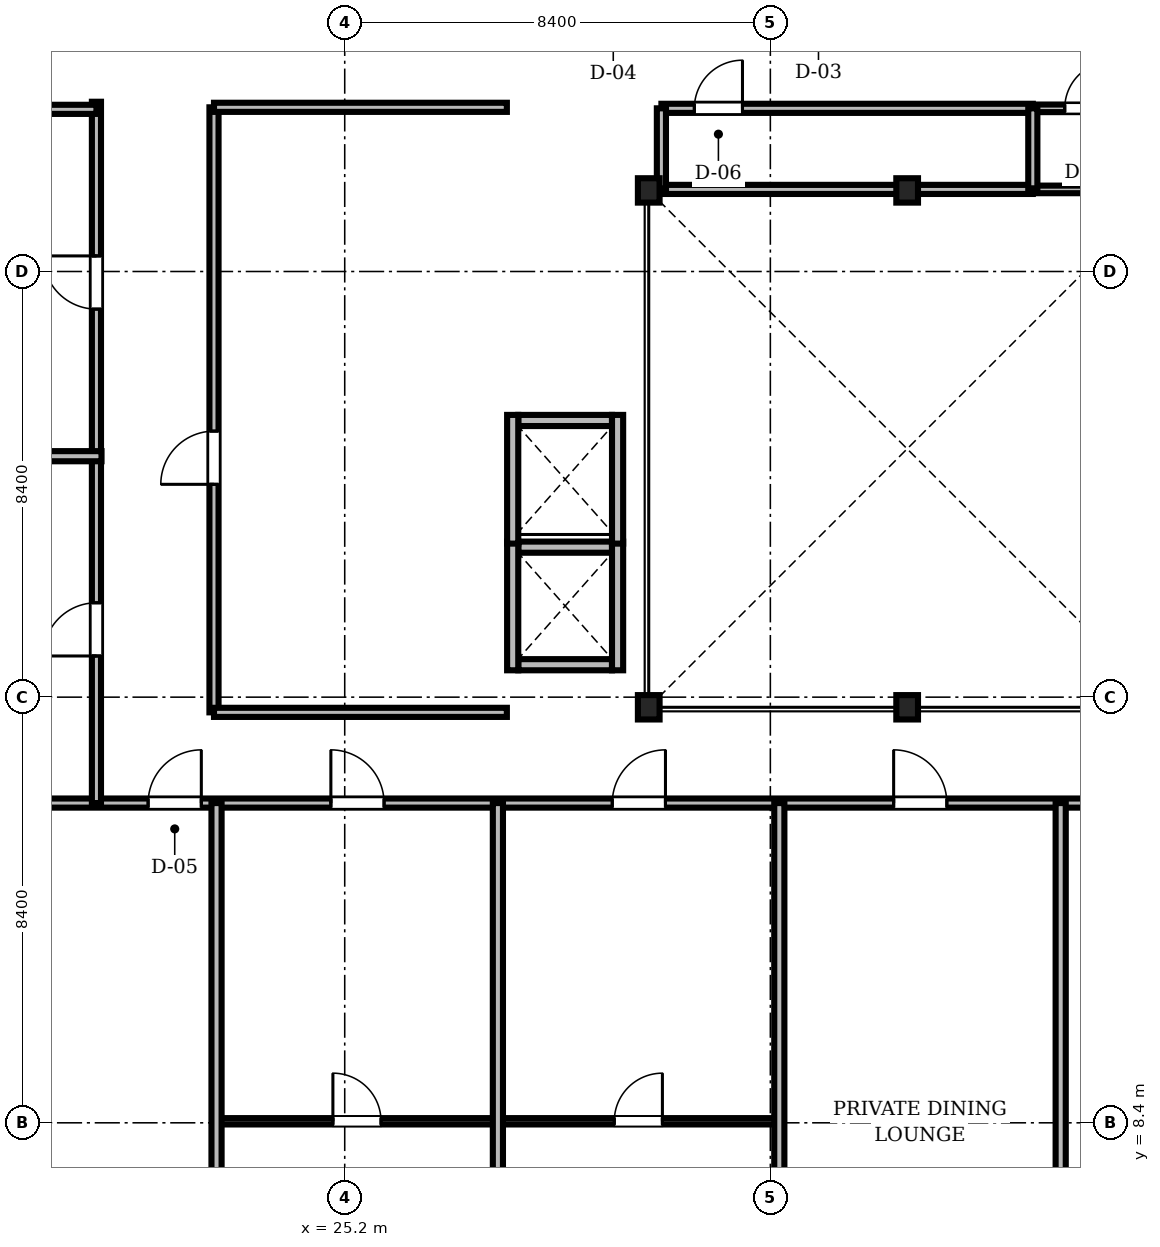
"""IFC4 building model, lengths in metres.
Left out: names, types, materials, properties, quantities, classifications, styles, units other than length and angle.
Written with IfcOpenShell. Run it as: python <this file> out.ifc"""

import sys

from ifc_helpers import new_model, si_unit, direction, frame, frame_2d, origin, origin_2d, place, context, subcontext, project, spatial, rectangle, i_section, extrude, source, transform, mapped, element, fill, save


model = new_model("IFC4")
c1 = context("Model", 3, precision=1e-05, world=origin(), true_north=direction((0.0, 1.0)))
c2 = subcontext(c1, "Body", "Model", "MODEL_VIEW")
j1 = project(units=[si_unit("LENGTHUNIT", "METRE"), si_unit("PLANEANGLEUNIT", "RADIAN")], contexts=[c1])
p1 = place(None, origin())
s1 = spatial("IfcSite", under=j1, at=p1, CompositionType="ELEMENT")
p2 = place(p1, origin())
s2 = spatial("IfcBuilding", under=s1, at=p2, CompositionType="ELEMENT")
p3 = place(p2, frame((0.0, 0.0, 71.4)))
s3 = spatial("IfcBuildingStorey", under=s2, at=p3, CompositionType="ELEMENT", Elevation=71.4)
m1 = source(origin(), c2, "Body", "SweptSolid", [
    extrude(i_section(OverallWidth=0.428, OverallDepth=0.481, WebThickness=0.04, FlangeThickness=0.063, FilletRadius=0.015, at=origin_2d()), origin(), (0.0, 0.0, 1.0), 3.41),
])
for number, where, z_axis, x_axis in (
    (1, (31.2, 16.6, 0.0), (0.0, 0.0, 1.0), (1.0, 0.0, 0.0)),
    (2, (36.3, 16.6, 0.0), (0.0, 0.0, 1.0), (1.0, 0.0, 0.0)),
    (3, (36.3, 26.8, 0.0), (0.0, 0.0, 1.0), (1.0, 0.0, 0.0)),
    (4, (31.2, 26.8, 0.0), (0.0, 0.0, 1.0), (1.0, 0.0, 0.0)),
):
    element("IfcColumn", number, at=place(p3, frame(where, z_axis=z_axis, x_axis=x_axis)), inside=s3, PredefinedType="COLUMN", context=c2, shape_type="MappedRepresentation", body=[
        mapped(m1, transform((0.0, 0.0, 0.0), scale=1.0)),
    ])
m2 = source(origin(), c2, "Body", "SweptSolid", [
    extrude(rectangle(XDim=1.85, YDim=0.22, at=frame_2d((0.925, 0.0))), origin(), (0.0, 0.0, 1.0), 3.41),
])
for number, where, z_axis, x_axis in (
    (5, (28.625, 17.44, 0.0), (0.0, 0.0, 1.0), (1.0, 0.0, 0.0)),
    (6, (28.625, 19.76, 0.0), (0.0, 0.0, 1.0), (1.0, 0.0, 0.0)),
):
    element("IfcWall", number, at=place(p3, frame(where, z_axis=z_axis, x_axis=x_axis)), inside=s3, PredefinedType="SOLIDWALL", context=c2, shape_type="MappedRepresentation", body=[
        mapped(m2, transform((0.0, 0.0, 0.0), scale=1.0)),
    ])
m3 = source(origin(), c2, "Body", "SweptSolid", [
    extrude(rectangle(XDim=2.54, YDim=0.22, at=frame_2d((1.27, 0.0))), origin(), (0.0, 0.0, 1.0), 3.41),
])
for number, where, z_axis, x_axis in (
    (7, (28.515, 17.33, 0.0), (0.0, 0.0, 1.0), (0.0, 1.0, 0.0)),
    (8, (30.585, 17.33, 0.0), (0.0, 0.0, 1.0), (0.0, 1.0, 0.0)),
):
    element("IfcWall", number, at=place(p3, frame(where, z_axis=z_axis, x_axis=x_axis)), inside=s3, PredefinedType="SOLIDWALL", context=c2, shape_type="MappedRepresentation", body=[
        mapped(m3, transform((0.0, 0.0, 0.0), scale=1.0)),
    ])
p4 = place(p3, frame((28.625, 22.26, 0.0), z_axis=(0.0, 0.0, 1.0), x_axis=(1.0, 0.0, 0.0)))
e9 = element("IfcWall", 9, at=p4, inside=s3, PredefinedType="SOLIDWALL", context=c2, shape_type="MappedRepresentation", body=[
    mapped(m2, transform((0.0, 0.0, 0.0), scale=1.0)),
])
for number, where, z_axis, x_axis in (
    (10, (28.515, 19.83, 0.0), (0.0, 0.0, 1.0), (0.0, 1.0, 0.0)),
    (11, (30.585, 19.83, 0.0), (0.0, 0.0, 1.0), (0.0, 1.0, 0.0)),
):
    element("IfcWall", number, at=place(p3, frame(where, z_axis=z_axis, x_axis=x_axis)), inside=s3, PredefinedType="SOLIDWALL", context=c2, shape_type="MappedRepresentation", body=[
        mapped(m3, transform((0.0, 0.0, 0.0), scale=1.0)),
    ])
m4 = source(origin(), c2, "Body", "SweptSolid", [
    extrude(rectangle(XDim=46.156, YDim=0.18, at=frame_2d((23.078, 0.0))), origin(), (0.0, 0.0, 1.0), 2.652),
])
p5 = place(p3, frame((2.422, 14.71, 0.0), z_axis=(0.0, 0.0, 1.0), x_axis=(1.0, 0.0, 0.0)))
e12 = element("IfcWall", 12, at=p5, inside=s3, PredefinedType="PARTITIONING", context=c2, shape_type="MappedRepresentation", body=[
    mapped(m4, transform((0.0, 0.0, 0.0), scale=1.0)),
])
m5 = source(origin(), c2, "Body", "SweptSolid", [
    extrude(rectangle(XDim=1.05, YDim=2.2, at=frame_2d((0.525, 1.1))), frame((0.0, 0.1, 0.0), z_axis=(0.0, -1.0, 0.0), x_axis=(1.0, 0.0, 0.0)), (0.0, 0.0, 1.0), 0.2),
])
p6 = place(p5, frame((18.898, 0.0, 0.0)))
e13 = element("IfcOpeningElement", 13, at=p6, cuts=e12, PredefinedType="OPENING", context=c2, shape_type="MappedRepresentation", body=[
    mapped(m5, transform((0.0, 0.0, 0.0), scale=1.0)),
])
p7 = place(p5, frame((22.505, 0.0, 0.0)))
e14 = element("IfcOpeningElement", 14, at=p7, cuts=e12, PredefinedType="OPENING", context=c2, shape_type="MappedRepresentation", body=[
    mapped(m5, transform((0.0, 0.0, 0.0), scale=1.0)),
])
p8 = place(p5, frame((28.058, 0.0, 0.0)))
e15 = element("IfcOpeningElement", 15, at=p8, cuts=e12, PredefinedType="OPENING", context=c2, shape_type="MappedRepresentation", body=[
    mapped(m5, transform((0.0, 0.0, 0.0), scale=1.0)),
])
p9 = place(p5, frame((33.611, 0.0, 0.0)))
e16 = element("IfcOpeningElement", 16, at=p9, cuts=e12, PredefinedType="OPENING", context=c2, shape_type="MappedRepresentation", body=[
    mapped(m5, transform((0.0, 0.0, 0.0), scale=1.0)),
])
p10 = place(p5, frame((40.998, 0.0, 0.0)))
e17 = element("IfcOpeningElement", 17, at=p10, cuts=e12, PredefinedType="OPENING", context=c2, shape_type="MappedRepresentation", body=[
    mapped(m5, transform((0.0, 0.0, 0.0), scale=1.0)),
])
m6 = source(origin(), c2, "Body", "SweptSolid", [
    extrude(rectangle(XDim=13.84, YDim=0.18, at=frame_2d((6.92, 0.0))), origin(), (0.0, 0.0, 1.0), 2.802),
])
p11 = place(p3, frame((20.3, 14.71, 0.0), z_axis=(0.0, 0.0, 1.0), x_axis=(0.0, 1.0, 0.0)))
e18 = element("IfcWall", 18, at=p11, inside=s3, PredefinedType="PARTITIONING", context=c2, shape_type="MappedRepresentation", body=[
    mapped(m6, transform((0.0, 0.0, 0.0), scale=1.0)),
])
p12 = place(p11, frame((2.903, 0.0, 0.0)))
e19 = element("IfcOpeningElement", 19, at=p12, cuts=e18, PredefinedType="OPENING", context=c2, shape_type="MappedRepresentation", body=[
    mapped(m5, transform((0.0, 0.0, 0.0), scale=1.0)),
])
p13 = place(p11, frame((9.748, 0.0, 0.0)))
e20 = element("IfcOpeningElement", 20, at=p13, cuts=e18, PredefinedType="OPENING", context=c2, shape_type="MappedRepresentation", body=[
    mapped(m5, transform((0.0, 0.0, 0.0), scale=1.0)),
])
m7 = source(origin(), c2, "Body", "SweptSolid", [
    extrude(rectangle(XDim=11.94, YDim=0.18, at=frame_2d((5.97, 0.0))), origin(), (0.0, 0.0, 1.0), 2.802),
])
p14 = place(p3, frame((22.62, 16.5, 0.0), z_axis=(0.0, 0.0, 1.0), x_axis=(0.0, 1.0, 0.0)))
e21 = element("IfcWall", 21, at=p14, inside=s3, PredefinedType="PARTITIONING", context=c2, shape_type="MappedRepresentation", body=[
    mapped(m7, transform((0.0, 0.0, 0.0), scale=1.0)),
])
p15 = place(p14, frame((4.5, 0.0, 0.0)))
e22 = element("IfcOpeningElement", 22, at=p15, cuts=e21, PredefinedType="OPENING", context=c2, shape_type="MappedRepresentation", body=[
    mapped(m5, transform((0.0, 0.0, 0.0), scale=1.0)),
])
m8 = source(origin(), c2, "Body", "SweptSolid", [
    extrude(rectangle(XDim=7.33, YDim=0.18, at=frame_2d((3.665, 0.0))), origin(), (0.0, 0.0, 1.0), 3.042),
])
p16 = place(p3, frame((31.45, 28.42, 0.0), z_axis=(0.0, 0.0, 1.0), x_axis=(1.0, 0.0, 0.0)))
e23 = element("IfcWall", 23, at=p16, inside=s3, PredefinedType="PARTITIONING", context=c2, shape_type="MappedRepresentation", body=[
    mapped(m8, transform((0.0, 0.0, 0.0), scale=1.0)),
])
m9 = source(origin(), c2, "Body", "SweptSolid", [
    extrude(rectangle(XDim=0.95, YDim=2.15, at=frame_2d((0.475, 1.075))), frame((0.0, 0.1, 0.0), z_axis=(0.0, -1.0, 0.0), x_axis=(1.0, 0.0, 0.0)), (0.0, 0.0, 1.0), 0.2),
])
p17 = place(p16, frame((0.65, 0.0, 0.0)))
e24 = element("IfcOpeningElement", 24, at=p17, cuts=e23, PredefinedType="OPENING", context=c2, shape_type="MappedRepresentation", body=[
    mapped(m9, transform((0.0, 0.0, 0.0), scale=1.0)),
])
m10 = source(origin(), c2, "Body", "SweptSolid", [
    extrude(rectangle(XDim=5.554, YDim=0.125, at=frame_2d((2.777, 0.0))), origin(), (0.0, 0.0, 1.0), 2.802),
])
p18 = place(p3, frame((28.223, 8.43, 0.0), z_axis=(0.0, 0.0, 1.0), x_axis=(1.0, 0.0, 0.0)))
e25 = element("IfcWall", 25, at=p18, inside=s3, PredefinedType="PARTITIONING", context=c2, shape_type="MappedRepresentation", body=[
    mapped(m10, transform((0.0, 0.0, 0.0), scale=1.0)),
])
m11 = source(origin(), c2, "Body", "SweptSolid", [
    extrude(rectangle(XDim=0.95, YDim=2.15, at=frame_2d((0.475, 1.075))), frame((0.0, 0.073, 0.0), z_axis=(0.0, -1.0, 0.0), x_axis=(1.0, 0.0, 0.0)), (0.0, 0.0, 1.0), 0.145),
])
p19 = place(p18, frame((2.297, 0.0, 0.0)))
e26 = element("IfcOpeningElement", 26, at=p19, cuts=e25, PredefinedType="OPENING", context=c2, shape_type="MappedRepresentation", body=[
    mapped(m11, transform((0.0, 0.0, 0.0), scale=1.0)),
])
m12 = source(origin(), c2, "Body", "SweptSolid", [
    extrude(rectangle(XDim=5.553, YDim=0.125, at=frame_2d((2.776, 0.0))), origin(), (0.0, 0.0, 1.0), 2.802),
])
p20 = place(p3, frame((22.67, 8.43, 0.0), z_axis=(0.0, 0.0, 1.0), x_axis=(1.0, 0.0, 0.0)))
e27 = element("IfcWall", 27, at=p20, inside=s3, PredefinedType="PARTITIONING", context=c2, shape_type="MappedRepresentation", body=[
    mapped(m12, transform((0.0, 0.0, 0.0), scale=1.0)),
])
p21 = place(p20, frame((2.297, 0.0, 0.0)))
e28 = element("IfcOpeningElement", 28, at=p21, cuts=e27, PredefinedType="OPENING", context=c2, shape_type="MappedRepresentation", body=[
    mapped(m11, transform((0.0, 0.0, 0.0), scale=1.0)),
])
m13 = source(origin(), c2, "Body", "SweptSolid", [
    extrude(rectangle(XDim=2.74, YDim=0.15, at=frame_2d((1.37, 0.0))), origin(), (0.0, 0.0, 1.0), 3.41),
])
p22 = place(p3, frame((38.78, 28.42, 0.0), z_axis=(0.0, 0.0, 1.0), x_axis=(1.0, 0.0, 0.0)))
e29 = element("IfcWall", 29, at=p22, inside=s3, PredefinedType="PARTITIONING", context=c2, shape_type="MappedRepresentation", body=[
    mapped(m13, transform((0.0, 0.0, 0.0), scale=1.0)),
])
m14 = source(origin(), c2, "Body", "SweptSolid", [
    extrude(rectangle(XDim=0.92, YDim=2.1, at=frame_2d((0.46, 1.05))), frame((0.0, 0.085, 0.0), z_axis=(0.0, -1.0, 0.0), x_axis=(1.0, 0.0, 0.0)), (0.0, 0.0, 1.0), 0.17),
])
p23 = place(p22, frame((0.63, 0.0, 0.0)))
e30 = element("IfcOpeningElement", 30, at=p23, cuts=e29, PredefinedType="OPENING", context=c2, shape_type="MappedRepresentation", body=[
    mapped(m14, transform((0.0, 0.0, 0.0), scale=1.0)),
])
m15 = source(origin(), c2, "Body", "SweptSolid", [
    extrude(rectangle(XDim=17.978, YDim=0.2, at=frame_2d((8.989, 0.0))), origin(), (0.0, 0.0, 1.0), 2.652),
])
p24 = place(p3, frame((2.422, 21.555, 0.0), z_axis=(0.0, 0.0, 1.0), x_axis=(1.0, 0.0, 0.0)))
e31 = element("IfcWall", 31, at=p24, inside=s3, PredefinedType="PARTITIONING", context=c2, shape_type="MappedRepresentation", body=[
    mapped(m15, transform((0.0, 0.0, 0.0), scale=1.0)),
])
m16 = source(origin(), c2, "Body", "SweptSolid", [
    extrude(rectangle(XDim=18.07, YDim=0.18, at=frame_2d((9.035, 0.0))), origin(), (0.0, 0.0, 1.0), 2.652),
])
p25 = place(p3, frame((2.23, 28.4, 0.0), z_axis=(0.0, 0.0, 1.0), x_axis=(1.0, 0.0, 0.0)))
e32 = element("IfcWall", 32, at=p25, inside=s3, PredefinedType="PARTITIONING", context=c2, shape_type="MappedRepresentation", body=[
    mapped(m16, transform((0.0, 0.0, 0.0), scale=1.0)),
])
m17 = source(origin(), c2, "Body", "SweptSolid", [
    extrude(rectangle(XDim=12.78, YDim=0.2, at=frame_2d((6.39, 0.0))), origin(), (0.0, 0.0, 1.0), 2.652),
])
for number, where, z_axis, x_axis in (
    (33, (22.67, 1.93, 0.0), (0.0, 0.0, 1.0), (0.0, 1.0, 0.0)),
    (34, (28.223, 1.93, 0.0), (0.0, 0.0, 1.0), (0.0, 1.0, 0.0)),
):
    element("IfcWall", number, at=place(p3, frame(where, z_axis=z_axis, x_axis=x_axis)), inside=s3, PredefinedType="PARTITIONING", context=c2, shape_type="MappedRepresentation", body=[
        mapped(m17, transform((0.0, 0.0, 0.0), scale=1.0)),
    ])
m18 = source(origin(), c2, "Body", "SweptSolid", [
    extrude(rectangle(XDim=12.588, YDim=0.2, at=frame_2d((6.294, 0.0))), origin(), (0.0, 0.0, 1.0), 2.652),
])
for number, where, z_axis, x_axis in (
    (35, (33.777, 2.122, 0.0), (0.0, 0.0, 1.0), (0.0, 1.0, 0.0)),
    (36, (39.33, 2.122, 0.0), (0.0, 0.0, 1.0), (0.0, 1.0, 0.0)),
):
    element("IfcWall", number, at=place(p3, frame(where, z_axis=z_axis, x_axis=x_axis)), inside=s3, PredefinedType="PARTITIONING", context=c2, shape_type="MappedRepresentation", body=[
        mapped(m18, transform((0.0, 0.0, 0.0), scale=1.0)),
    ])
m19 = source(origin(), c2, "Body", "SweptSolid", [
    extrude(rectangle(XDim=7.33, YDim=0.18, at=frame_2d((3.665, 0.0))), origin(), (0.0, 0.0, 1.0), 2.952),
])
p26 = place(p3, frame((31.45, 26.82, 0.0), z_axis=(0.0, 0.0, 1.0), x_axis=(1.0, 0.0, 0.0)))
e37 = element("IfcWall", 37, at=p26, inside=s3, PredefinedType="PARTITIONING", context=c2, shape_type="MappedRepresentation", body=[
    mapped(m19, transform((0.0, 0.0, 0.0), scale=1.0)),
])
m20 = source(origin(), c2, "Body", "SweptSolid", [
    extrude(rectangle(XDim=5.78, YDim=0.18, at=frame_2d((2.89, 0.0))), origin(), (0.0, 0.0, 1.0), 2.802),
])
p27 = place(p3, frame((22.62, 16.5, 0.0), z_axis=(0.0, 0.0, 1.0), x_axis=(1.0, 0.0, 0.0)))
e38 = element("IfcWall", 38, at=p27, inside=s3, PredefinedType="PARTITIONING", context=c2, shape_type="MappedRepresentation", body=[
    mapped(m20, transform((0.0, 0.0, 0.0), scale=1.0)),
])
m21 = source(origin(), c2, "Body", "SweptSolid", [
    extrude(rectangle(XDim=5.78, YDim=0.18, at=frame_2d((2.89, 0.0))), origin(), (0.0, 0.0, 1.0), 3.41),
])
p28 = place(p3, frame((22.62, 28.44, 0.0), z_axis=(0.0, 0.0, 1.0), x_axis=(1.0, 0.0, 0.0)))
e39 = element("IfcWall", 39, at=p28, inside=s3, PredefinedType="PARTITIONING", context=c2, shape_type="MappedRepresentation", body=[
    mapped(m21, transform((0.0, 0.0, 0.0), scale=1.0)),
])
m22 = source(origin(), c2, "Body", "SweptSolid", [
    extrude(rectangle(XDim=2.74, YDim=0.15, at=frame_2d((1.37, 0.0))), origin(), (0.0, 0.0, 1.0), 2.802),
])
p29 = place(p3, frame((38.78, 26.82, 0.0), z_axis=(0.0, 0.0, 1.0), x_axis=(1.0, 0.0, 0.0)))
e40 = element("IfcWall", 40, at=p29, inside=s3, PredefinedType="PARTITIONING", context=c2, shape_type="MappedRepresentation", body=[
    mapped(m22, transform((0.0, 0.0, 0.0), scale=1.0)),
])
m23 = source(origin(), c2, "Body", "SweptSolid", [
    extrude(rectangle(XDim=1.6, YDim=0.18, at=frame_2d((0.8, 0.0))), origin(), (0.0, 0.0, 1.0), 2.952),
])
for number, where, z_axis, x_axis in (
    (41, (31.45, 26.82, 0.0), (0.0, 0.0, 1.0), (0.0, 1.0, 0.0)),
    (42, (38.78, 26.82, 0.0), (0.0, 0.0, 1.0), (0.0, 1.0, 0.0)),
):
    element("IfcWall", number, at=place(p3, frame(where, z_axis=z_axis, x_axis=x_axis)), inside=s3, PredefinedType="PARTITIONING", context=c2, shape_type="MappedRepresentation", body=[
        mapped(m23, transform((0.0, 0.0, 0.0), scale=1.0)),
    ])
m24 = source(origin(), c2, "Body", "SweptSolid", [
    extrude(rectangle(XDim=1.05, YDim=2.2, at=frame_2d((0.525, 1.1))), frame((0.0, 0.025, 0.0), z_axis=(0.0, -1.0, 0.0), x_axis=(1.0, 0.0, 0.0)), (0.0, 0.0, 1.0), 0.05),
])
p30 = place(p6, origin())
e43 = element("IfcDoor", 43, at=p30, inside=s3, OperationType="SINGLE_SWING_RIGHT", PredefinedType="DOOR", context=c2, shape_type="MappedRepresentation", body=[
    mapped(m24, transform((0.0, 0.0, 0.0), scale=1.0)),
])
fill(e13, e43)
p31 = place(p7, origin())
e44 = element("IfcDoor", 44, at=p31, inside=s3, OperationType="SINGLE_SWING_LEFT", PredefinedType="DOOR", context=c2, shape_type="MappedRepresentation", body=[
    mapped(m24, transform((0.0, 0.0, 0.0), scale=1.0)),
])
fill(e14, e44)
p32 = place(p8, origin())
e45 = element("IfcDoor", 45, at=p32, inside=s3, OperationType="SINGLE_SWING_RIGHT", PredefinedType="DOOR", context=c2, shape_type="MappedRepresentation", body=[
    mapped(m24, transform((0.0, 0.0, 0.0), scale=1.0)),
])
fill(e15, e45)
p33 = place(p9, origin())
e46 = element("IfcDoor", 46, at=p33, inside=s3, OperationType="SINGLE_SWING_LEFT", PredefinedType="DOOR", context=c2, shape_type="MappedRepresentation", body=[
    mapped(m24, transform((0.0, 0.0, 0.0), scale=1.0)),
])
fill(e16, e46)
p34 = place(p12, origin())
e47 = element("IfcDoor", 47, at=p34, inside=s3, OperationType="SINGLE_SWING_LEFT", PredefinedType="DOOR", context=c2, shape_type="MappedRepresentation", body=[
    mapped(m24, transform((0.0, 0.0, 0.0), scale=1.0)),
])
fill(e19, e47)
p35 = place(p13, origin())
e48 = element("IfcDoor", 48, at=p35, inside=s3, OperationType="SINGLE_SWING_RIGHT", PredefinedType="DOOR", context=c2, shape_type="MappedRepresentation", body=[
    mapped(m24, transform((0.0, 0.0, 0.0), scale=1.0)),
])
fill(e20, e48)
p36 = place(p15, origin())
e49 = element("IfcDoor", 49, at=p36, inside=s3, OperationType="SINGLE_SWING_LEFT", PredefinedType="DOOR", context=c2, shape_type="MappedRepresentation", body=[
    mapped(m24, transform((0.0, 0.0, 0.0), scale=1.0)),
])
fill(e22, e49)
m25 = source(origin(), c2, "Body", "SweptSolid", [
    extrude(rectangle(XDim=0.95, YDim=2.15, at=frame_2d((0.475, 1.075))), frame((0.0, 0.025, 0.0), z_axis=(0.0, -1.0, 0.0), x_axis=(1.0, 0.0, 0.0)), (0.0, 0.0, 1.0), 0.05),
])
p37 = place(p17, origin())
e50 = element("IfcDoor", 50, at=p37, inside=s3, OperationType="SINGLE_SWING_RIGHT", PredefinedType="DOOR", context=c2, shape_type="MappedRepresentation", body=[
    mapped(m25, transform((0.0, 0.0, 0.0), scale=1.0)),
])
fill(e24, e50)
p38 = place(p19, origin())
e51 = element("IfcDoor", 51, at=p38, inside=s3, OperationType="SINGLE_SWING_RIGHT", PredefinedType="DOOR", context=c2, shape_type="MappedRepresentation", body=[
    mapped(m25, transform((0.0, 0.0, 0.0), scale=1.0)),
])
fill(e26, e51)
p39 = place(p21, origin())
e52 = element("IfcDoor", 52, at=p39, inside=s3, OperationType="SINGLE_SWING_LEFT", PredefinedType="DOOR", context=c2, shape_type="MappedRepresentation", body=[
    mapped(m25, transform((0.0, 0.0, 0.0), scale=1.0)),
])
fill(e28, e52)
m26 = source(origin(), c2, "Body", "SweptSolid", [
    extrude(rectangle(XDim=0.92, YDim=2.1, at=frame_2d((0.46, 1.05))), frame((0.0, 0.025, 0.0), z_axis=(0.0, -1.0, 0.0), x_axis=(1.0, 0.0, 0.0)), (0.0, 0.0, 1.0), 0.05),
])
p40 = place(p23, origin())
e53 = element("IfcDoor", 53, at=p40, inside=s3, OperationType="SINGLE_SWING_RIGHT", PredefinedType="DOOR", context=c2, shape_type="MappedRepresentation", body=[
    mapped(m26, transform((0.0, 0.0, 0.0), scale=1.0)),
])
fill(e30, e53)
save(model, sys.argv[1])
